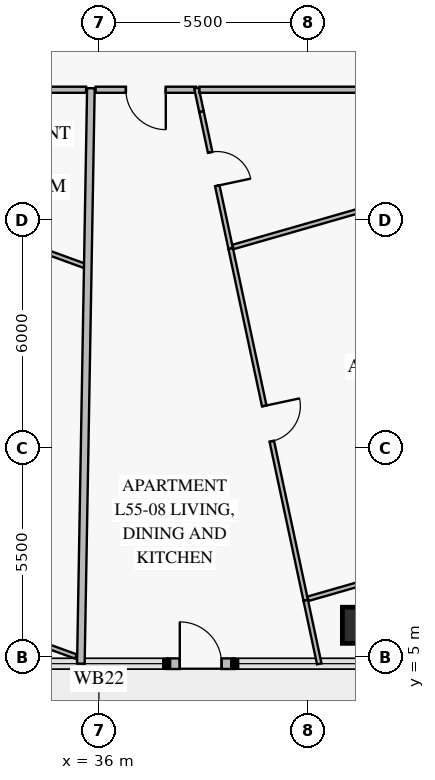
"""IFC4 building model, lengths in metres.
Left out: names, types, materials, properties, quantities, classifications, styles, units other than length and angle.
Written with IfcOpenShell. Run it as: python <this file> out.ifc"""

import sys

from ifc_helpers import new_model, si_unit, direction, frame, frame_2d, origin, origin_2d, place, context, subcontext, project, spatial, rectangle, extrude, element, fill, save


model = new_model("IFC4")
c1 = context("Model", 3, precision=1e-05, world=origin(), true_north=direction((0.0, 1.0)))
c2 = subcontext(c1, "Body", "Model", "MODEL_VIEW")
j1 = project(units=[si_unit("LENGTHUNIT", "METRE"), si_unit("PLANEANGLEUNIT", "RADIAN")], contexts=[c1])
p1 = place(None, origin())
s1 = spatial("IfcSite", under=j1, at=p1, CompositionType="ELEMENT")
p2 = place(p1, origin())
s2 = spatial("IfcBuilding", under=s1, at=p2, CompositionType="ELEMENT")
p3 = place(p2, frame((0.0, 0.0, 218.8)))
s3 = spatial("IfcBuildingStorey", under=s2, at=p3, CompositionType="ELEMENT", Elevation=218.8)
p4 = place(p3, frame((42.882, 5.827, 0.0), z_axis=(0.0, 0.0, 1.0), x_axis=(1.0, 0.0, 0.0)))
e1 = element("IfcColumn", 1, at=p4, inside=s3, PredefinedType="COLUMN", context=c2, shape_type="SweptSolid", body=[
    extrude(rectangle(XDim=0.95, YDim=0.95, at=origin_2d()), origin(), (0.0, 0.0, 1.0), 3.55),
])
p5 = place(p3, frame((39.573, 4.817, 0.0), z_axis=(0.0, 0.0, 1.0), x_axis=(-1.0, 0.0, 0.0)))
e2 = element("IfcWall", 2, at=p5, inside=s3, PredefinedType="SOLIDWALL", context=c2, shape_type="SweptSolid", body=[
    extrude(rectangle(XDim=1.79, YDim=0.28, at=frame_2d((0.895, 0.0))), origin(), (0.0, 0.0, 1.0), 3.55),
])
p6 = place(p5, frame((0.345, 0.0, 0.0)))
e3 = element("IfcOpeningElement", 3, at=p6, cuts=e2, PredefinedType="OPENING", context=c2, shape_type="SweptSolid", body=[
    extrude(rectangle(XDim=1.1, YDim=2.2, at=frame_2d((0.55, 1.1))), frame((0.0, 0.152, 0.0), z_axis=(0.0, -1.0, 0.0), x_axis=(1.0, 0.0, 0.0)), (0.0, 0.0, 1.0), 0.304),
])
p7 = place(p3, frame((25.452, 8.625, 0.0), z_axis=(0.0, 0.0, 1.0), x_axis=(0.939694340758, -0.342015417705, 0.0)))
e4 = element("IfcWall", 4, at=p7, inside=s3, PredefinedType="PARTITIONING", context=c2, shape_type="SweptSolid", body=[
    extrude(rectangle(XDim=10.58, YDim=0.12, at=frame_2d((5.29, 0.0))), origin(), (0.0, 0.0, 1.0), 2.87),
])
p8 = place(p7, frame((2.628, 0.0, 0.0)))
e5 = element("IfcOpeningElement", 5, at=p8, cuts=e4, PredefinedType="OPENING", context=c2, shape_type="SweptSolid", body=[
    extrude(rectangle(XDim=0.95, YDim=2.1, at=frame_2d((0.475, 1.05))), frame((0.0, 0.072, 0.0), z_axis=(0.0, -1.0, 0.0), x_axis=(1.0, 0.0, 0.0)), (0.0, 0.0, 1.0), 0.144),
])
p9 = place(p3, frame((38.698, 19.35, 0.0), z_axis=(0.0, 0.0, 1.0), x_axis=(0.208639315119, -0.97799265651, 0.0)))
e6 = element("IfcWall", 6, at=p9, inside=s3, PredefinedType="PARTITIONING", context=c2, shape_type="SweptSolid", body=[
    extrude(rectangle(XDim=3.692, YDim=0.12, at=frame_2d((1.846, 0.0))), origin(), (0.0, 0.0, 1.0), 3.55),
])
p10 = place(p9, frame((1.101, 0.0, 0.0)))
e7 = element("IfcOpeningElement", 7, at=p10, cuts=e6, PredefinedType="OPENING", context=c2, shape_type="SweptSolid", body=[
    extrude(rectangle(XDim=0.9, YDim=2.1, at=frame_2d((0.45, 1.05))), frame((0.0, 0.072, 0.0), z_axis=(0.0, -1.0, 0.0), x_axis=(1.0, 0.0, 0.0)), (0.0, 0.0, 1.0), 0.144),
])
p11 = place(p3, frame((39.468, 15.74, 0.0), z_axis=(0.0, 0.0, 1.0), x_axis=(0.208609525866, -0.977999011103, 0.0)))
e8 = element("IfcWall", 8, at=p11, inside=s3, PredefinedType="PARTITIONING", context=c2, shape_type="SweptSolid", body=[
    extrude(rectangle(XDim=9.466, YDim=0.12, at=frame_2d((4.733, 0.0))), origin(), (0.0, 0.0, 1.0), 3.15),
])
p12 = place(p11, frame((4.233, 0.0, 0.0)))
e9 = element("IfcOpeningElement", 9, at=p12, cuts=e8, PredefinedType="OPENING", context=c2, shape_type="SweptSolid", body=[
    extrude(rectangle(XDim=0.95, YDim=2.1, at=frame_2d((0.475, 1.05))), frame((0.0, 0.072, 0.0), z_axis=(0.0, -1.0, 0.0), x_axis=(1.0, 0.0, 0.0)), (0.0, 0.0, 1.0), 0.144),
])
p13 = place(p3, frame((41.503, 6.525, 0.0), z_axis=(0.0, 0.0, 1.0), x_axis=(0.961260813995, 0.2756404315, 0.0)))
e10 = element("IfcWall", 10, at=p13, inside=s3, PredefinedType="PARTITIONING", context=c2, shape_type="SweptSolid", body=[
    extrude(rectangle(XDim=9.539, YDim=0.12, at=frame_2d((4.77, 0.0))), origin(), (0.0, 0.0, 1.0), 2.87),
])
p14 = place(p13, frame((4.21, 0.0, 0.0)))
e11 = element("IfcOpeningElement", 11, at=p14, cuts=e10, PredefinedType="OPENING", context=c2, shape_type="SweptSolid", body=[
    extrude(rectangle(XDim=0.95, YDim=2.1, at=frame_2d((0.475, 1.05))), frame((0.0, 0.072, 0.0), z_axis=(0.0, -1.0, 0.0), x_axis=(1.0, 0.0, 0.0)), (0.0, 0.0, 1.0), 0.144),
])
p15 = place(p3, frame((35.915, 19.92, 0.0), z_axis=(0.0, 0.0, 1.0), x_axis=(1.0, 0.0, 0.0)))
e12 = element("IfcWall", 12, at=p15, inside=s3, PredefinedType="PARTITIONING", context=c2, shape_type="SweptSolid", body=[
    extrude(rectangle(XDim=2.641, YDim=0.16, at=frame_2d((1.321, 0.0))), origin(), (0.0, 0.0, 1.0), 3.55),
])
p16 = place(p15, frame((0.796, 0.0, 0.0)))
e13 = element("IfcOpeningElement", 13, at=p16, cuts=e12, PredefinedType="OPENING", context=c2, shape_type="SweptSolid", body=[
    extrude(rectangle(XDim=1.05, YDim=2.15, at=frame_2d((0.525, 1.075))), frame((0.0, 0.092, 0.0), z_axis=(0.0, -1.0, 0.0), x_axis=(1.0, 0.0, 0.0)), (0.0, 0.0, 1.0), 0.184),
])
p17 = place(p3, frame((29.493, 17.518, 0.0), z_axis=(0.0, 0.0, 1.0), x_axis=(0.939702180936, -0.341993875886, 0.0)))
e14 = element("IfcWall", 14, at=p17, inside=s3, PredefinedType="PARTITIONING", context=c2, shape_type="SweptSolid", body=[
    extrude(rectangle(XDim=6.565, YDim=0.12, at=frame_2d((3.282, 0.0))), origin(), (0.0, 0.0, 1.0), 2.9),
])
p18 = place(p3, frame((35.79, 19.96, 0.0), z_axis=(0.0, 0.0, 1.0), x_axis=(-0.017457758886, -0.999847601715, 0.0)))
e15 = element("IfcWall", 15, at=p18, inside=s3, PredefinedType="PARTITIONING", context=c2, shape_type="SweptSolid", body=[
    extrude(rectangle(XDim=15.145, YDim=0.2, at=frame_2d((7.573, 0.0))), origin(), (0.0, 0.0, 1.0), 2.87),
])
p19 = place(p3, frame((38.567, 19.964, 0.0), z_axis=(0.0, 0.0, 1.0), x_axis=(0.208732655381, -0.977972739179, 0.0)))
e16 = element("IfcWall", 16, at=p19, inside=s3, PredefinedType="PARTITIONING", context=c2, shape_type="SweptSolid", body=[
    extrude(rectangle(XDim=0.628, YDim=0.12, at=frame_2d((0.314, 0.0))), origin(), (0.0, 0.0, 1.0), 3.55),
])
p20 = place(p3, frame((41.443, 6.482, 0.0), z_axis=(0.0, 0.0, 1.0), x_axis=(0.208581952585, -0.978004892143, 0.0)))
e17 = element("IfcWall", 17, at=p20, inside=s3, PredefinedType="PARTITIONING", context=c2, shape_type="SweptSolid", body=[
    extrude(rectangle(XDim=1.708, YDim=0.12, at=frame_2d((0.854, 0.0))), origin(), (0.0, 0.0, 1.0), 2.87),
])
p21 = place(p3, frame((39.529, 15.783, 0.0), z_axis=(0.0, 0.0, 1.0), x_axis=(0.961270836863, 0.275605475628, 0.0)))
e18 = element("IfcWall", 18, at=p21, inside=s3, PredefinedType="PARTITIONING", context=c2, shape_type="SweptSolid", body=[
    extrude(rectangle(XDim=6.088, YDim=0.12, at=frame_2d((3.044, 0.0))), origin(), (0.0, 0.0, 1.0), 2.9),
])
p22 = place(p3, frame((30.532, 19.92, 0.0), z_axis=(0.0, 0.0, 1.0), x_axis=(1.0, 0.0, 0.0)))
e19 = element("IfcWall", 19, at=p22, inside=s3, PredefinedType="PARTITIONING", context=c2, shape_type="SweptSolid", body=[
    extrude(rectangle(XDim=5.132, YDim=0.16, at=frame_2d((2.566, 0.0))), origin(), (0.0, 0.0, 1.0), 2.9),
])
p23 = place(p3, frame((38.646, 19.92, 0.0), z_axis=(0.0, 0.0, 1.0), x_axis=(1.0, 0.0, 0.0)))
e20 = element("IfcWall", 20, at=p23, inside=s3, PredefinedType="PARTITIONING", context=c2, shape_type="SweptSolid", body=[
    extrude(rectangle(XDim=5.026, YDim=0.16, at=frame_2d((2.513, 0.0))), origin(), (0.0, 0.0, 1.0), 2.9),
])
p24 = place(p6, frame((1.1, 0.0, 0.0), z_axis=(0.0, 0.0, 1.0), x_axis=(-1.0, 0.0, 0.0)))
e21 = element("IfcDoor", 21, at=p24, inside=s3, OperationType="SINGLE_SWING_LEFT", PredefinedType="DOOR", context=c2, shape_type="SweptSolid", body=[
    extrude(rectangle(XDim=1.1, YDim=2.2, at=frame_2d((0.55, 1.1))), frame((0.0, 0.025, 0.0), z_axis=(0.0, -1.0, 0.0), x_axis=(1.0, 0.0, 0.0)), (0.0, 0.0, 1.0), 0.05),
])
fill(e3, e21)
p25 = place(p10, origin())
e22 = element("IfcDoor", 22, at=p25, inside=s3, OperationType="SINGLE_SWING_RIGHT", PredefinedType="DOOR", context=c2, shape_type="SweptSolid", body=[
    extrude(rectangle(XDim=0.9, YDim=2.1, at=frame_2d((0.45, 1.05))), frame((0.0, 0.025, 0.0), z_axis=(0.0, -1.0, 0.0), x_axis=(1.0, 0.0, 0.0)), (0.0, 0.0, 1.0), 0.05),
])
fill(e7, e22)
p26 = place(p12, origin())
e23 = element("IfcDoor", 23, at=p26, inside=s3, OperationType="SINGLE_SWING_LEFT", PredefinedType="DOOR", context=c2, shape_type="SweptSolid", body=[
    extrude(rectangle(XDim=0.95, YDim=2.1, at=frame_2d((0.475, 1.05))), frame((0.0, 0.025, 0.0), z_axis=(0.0, -1.0, 0.0), x_axis=(1.0, 0.0, 0.0)), (0.0, 0.0, 1.0), 0.05),
])
fill(e9, e23)
p27 = place(p16, frame((1.05, 0.0, 0.0), z_axis=(0.0, 0.0, 1.0), x_axis=(-1.0, 0.0, 0.0)))
e24 = element("IfcDoor", 24, at=p27, inside=s3, OperationType="SINGLE_SWING_LEFT", PredefinedType="DOOR", context=c2, shape_type="SweptSolid", body=[
    extrude(rectangle(XDim=1.05, YDim=2.15, at=frame_2d((0.525, 1.075))), frame((0.0, 0.025, 0.0), z_axis=(0.0, -1.0, 0.0), x_axis=(1.0, 0.0, 0.0)), (0.0, 0.0, 1.0), 0.05),
])
fill(e13, e24)
save(model, sys.argv[1])
